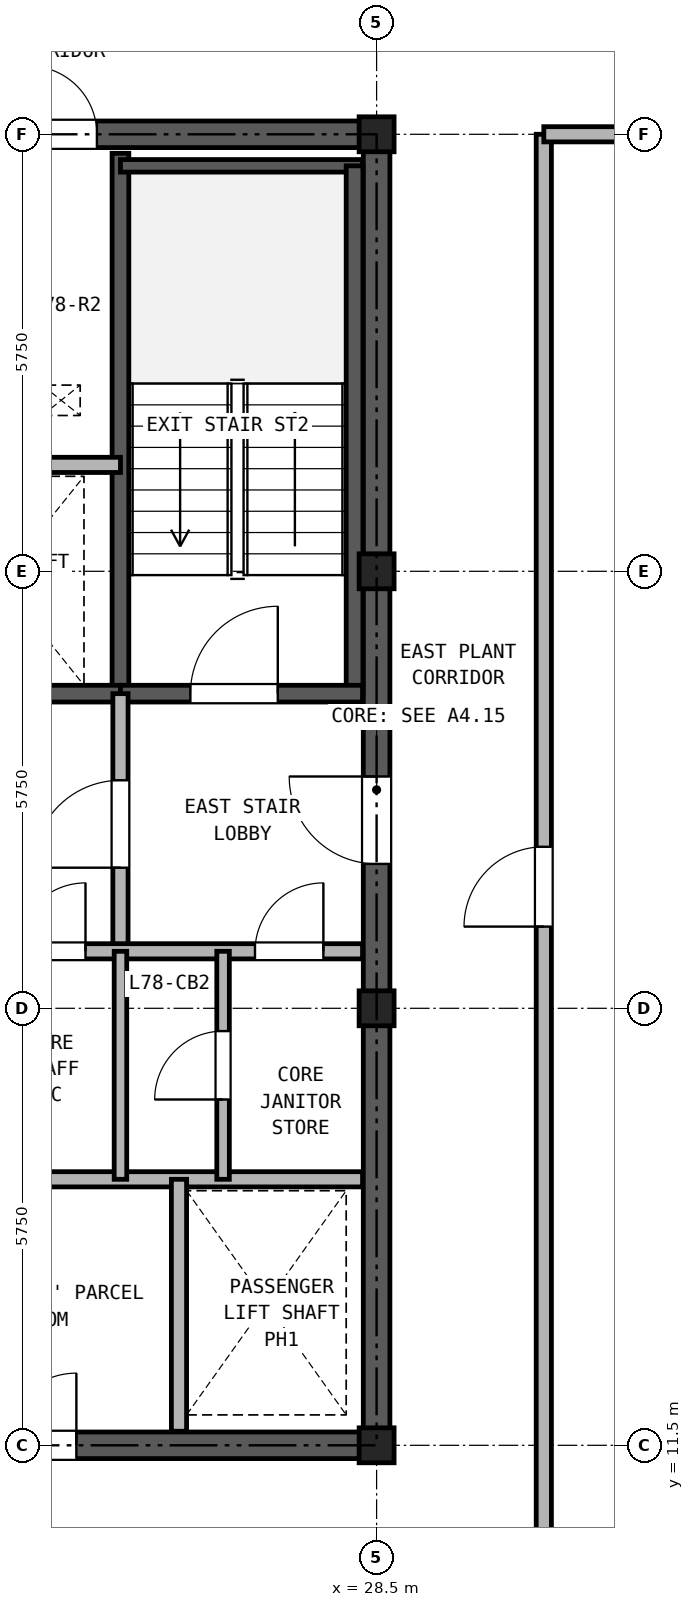
"""IFC4 building model, lengths in metres.
Left out: names, types, materials, properties, quantities, classifications, styles, units other than length and angle.
Written with IfcOpenShell. Run it as: python <this file> out.ifc"""

import sys

from ifc_helpers import new_model, si_unit, direction, frame, frame_2d, origin, origin_2d, place, context, subcontext, project, spatial, rectangle, hollow_rectangle, extrude, source, transform, mapped, element, fill, save


model = new_model("IFC4")
c1 = context("Model", 3, precision=1e-05, world=origin(), true_north=direction((0.0, 1.0)))
c2 = subcontext(c1, "Body", "Model", "MODEL_VIEW")
j1 = project(units=[si_unit("LENGTHUNIT", "METRE"), si_unit("PLANEANGLEUNIT", "RADIAN")], contexts=[c1])
p1 = place(None, origin())
s1 = spatial("IfcSite", under=j1, at=p1, CompositionType="ELEMENT")
p2 = place(p1, origin())
s2 = spatial("IfcBuilding", under=s1, at=p2, CompositionType="ELEMENT")
p3 = place(p2, frame((0.0, 0.0, 271.3)))
s3 = spatial("IfcBuildingStorey", under=s2, at=p3, CompositionType="ELEMENT", Elevation=271.3)
m1 = source(origin(), c2, "Body", "SweptSolid", [
    extrude(hollow_rectangle(XDim=0.46, YDim=0.46, WallThickness=0.025, at=origin_2d()), origin(), (0.0, 0.0, 1.0), 3.38),
])
for number, where, z_axis, x_axis in (
    (1, (28.5, 11.5, 0.0), (0.0, 0.0, 1.0), (1.0, 0.0, 0.0)),
    (2, (28.5, 17.25, 0.0), (0.0, 0.0, 1.0), (1.0, 0.0, 0.0)),
    (3, (28.5, 23.0, 0.0), (0.0, 0.0, 1.0), (1.0, 0.0, 0.0)),
    (4, (28.5, 28.75, 0.0), (0.0, 0.0, 1.0), (1.0, 0.0, 0.0)),
):
    element("IfcColumn", number, at=place(p3, frame(where, z_axis=z_axis, x_axis=x_axis)), inside=s3, PredefinedType="COLUMN", context=c2, shape_type="MappedRepresentation", body=[
        mapped(m1, transform((0.0, 0.0, 0.0), x_axis=(1.0, 0.0, 0.0), y_axis=(0.0, 1.0, 0.0), z_axis=(0.0, 0.0, 1.0), scale=1.0)),
    ])
p4 = place(p3, frame((18.325, 11.5, 0.0), z_axis=(0.0, 0.0, 1.0), x_axis=(1.0, 0.0, 0.0)))
e5 = element("IfcWall", 5, at=p4, inside=s3, PredefinedType="SHEAR", context=c2, shape_type="SweptSolid", body=[
    extrude(rectangle(XDim=10.35, YDim=0.35, at=frame_2d((5.175, 0.0))), origin(), (0.0, 0.0, 1.0), 3.38),
])
p5 = place(p4, frame((1.775, 0.0, 0.0)))
e6 = element("IfcOpeningElement", 6, at=p5, cuts=e5, PredefinedType="OPENING", context=c2, shape_type="SweptSolid", body=[
    extrude(rectangle(XDim=0.95, YDim=2.15, at=frame_2d((0.475, 1.075))), frame((0.0, 0.185, 0.0), z_axis=(0.0, -1.0, 0.0), x_axis=(1.0, 0.0, 0.0)), (0.0, 0.0, 1.0), 0.37),
])
p6 = place(p4, frame((5.275, 0.0, 0.0)))
e7 = element("IfcOpeningElement", 7, at=p6, cuts=e5, PredefinedType="OPENING", context=c2, shape_type="SweptSolid", body=[
    extrude(rectangle(XDim=0.95, YDim=2.15, at=frame_2d((0.475, 1.075))), frame((0.0, 0.185, 0.0), z_axis=(0.0, -1.0, 0.0), x_axis=(1.0, 0.0, 0.0)), (0.0, 0.0, 1.0), 0.37),
])
p7 = place(p3, frame((18.325, 28.75, 0.0), z_axis=(0.0, 0.0, 1.0), x_axis=(1.0, 0.0, 0.0)))
e8 = element("IfcWall", 8, at=p7, inside=s3, PredefinedType="SHEAR", context=c2, shape_type="SweptSolid", body=[
    extrude(rectangle(XDim=10.35, YDim=0.35, at=frame_2d((5.175, 0.0))), origin(), (0.0, 0.0, 1.0), 3.38),
])
p8 = place(p7, frame((4.055, 0.0, 0.0)))
e9 = element("IfcOpeningElement", 9, at=p8, cuts=e8, PredefinedType="OPENING", context=c2, shape_type="SweptSolid", body=[
    extrude(rectangle(XDim=0.9, YDim=2.05, at=frame_2d((0.45, 1.025))), frame((0.0, 0.185, 0.0), z_axis=(0.0, -1.0, 0.0), x_axis=(1.0, 0.0, 0.0)), (0.0, 0.0, 1.0), 0.37),
])
p9 = place(p7, frame((5.595, 0.0, 0.0)))
e10 = element("IfcOpeningElement", 10, at=p9, cuts=e8, PredefinedType="OPENING", context=c2, shape_type="SweptSolid", body=[
    extrude(rectangle(XDim=0.9, YDim=2.05, at=frame_2d((0.45, 1.025))), frame((0.0, 0.185, 0.0), z_axis=(0.0, -1.0, 0.0), x_axis=(1.0, 0.0, 0.0)), (0.0, 0.0, 1.0), 0.37),
])
p10 = place(p3, frame((28.5, 11.675, 0.0), z_axis=(0.0, 0.0, 1.0), x_axis=(0.0, 1.0, 0.0)))
e11 = element("IfcWall", 11, at=p10, inside=s3, PredefinedType="SHEAR", context=c2, shape_type="SweptSolid", body=[
    extrude(rectangle(XDim=16.9, YDim=0.35, at=frame_2d((8.45, 0.0))), origin(), (0.0, 0.0, 1.0), 3.38),
])
p11 = place(p10, frame((7.475, 0.0, 0.0)))
e12 = element("IfcOpeningElement", 12, at=p11, cuts=e11, PredefinedType="OPENING", context=c2, shape_type="SweptSolid", body=[
    extrude(rectangle(XDim=1.15, YDim=2.2, at=frame_2d((0.575, 1.1))), frame((0.0, 0.185, 0.0), z_axis=(0.0, -1.0, 0.0), x_axis=(1.0, 0.0, 0.0)), (0.0, 0.0, 1.0), 0.37),
])
p12 = place(p3, frame((25.13, 21.39, 0.0), z_axis=(0.0, 0.0, 1.0), x_axis=(0.0, 1.0, 0.0)))
e13 = element("IfcWall", 13, at=p12, inside=s3, PredefinedType="SOLIDWALL", context=c2, shape_type="SweptSolid", body=[
    extrude(rectangle(XDim=7.11, YDim=0.22, at=frame_2d((3.555, 0.0))), origin(), (0.0, 0.0, 1.0), 3.38),
])
p13 = place(p3, frame((25.13, 28.335, 0.0), z_axis=(0.0, 0.0, 1.0), x_axis=(1.0, 0.0, 0.0)))
e14 = element("IfcWall", 14, at=p13, inside=s3, PredefinedType="PARTITIONING", context=c2, shape_type="SweptSolid", body=[
    extrude(rectangle(XDim=3.185, YDim=0.165, at=frame_2d((1.593, 0.0))), origin(), (0.0, 0.0, 1.0), 3.38),
])
p14 = place(p3, frame((28.21, 21.39, 0.0), z_axis=(0.0, 0.0, 1.0), x_axis=(0.0, 1.0, 0.0)))
e15 = element("IfcWall", 15, at=p14, inside=s3, PredefinedType="SOLIDWALL", context=c2, shape_type="SweptSolid", body=[
    extrude(rectangle(XDim=6.945, YDim=0.22, at=frame_2d((3.473, 0.0))), origin(), (0.0, 0.0, 1.0), 3.38),
])
p15 = place(p3, frame((18.685, 21.39, 0.0), z_axis=(0.0, 0.0, 1.0), x_axis=(1.0, 0.0, 0.0)))
e16 = element("IfcWall", 16, at=p15, inside=s3, PredefinedType="SOLIDWALL", context=c2, shape_type="SweptSolid", body=[
    extrude(rectangle(XDim=6.445, YDim=0.22, at=frame_2d((3.222, 0.0))), origin(), (0.0, 0.0, 1.0), 3.38),
])
p16 = place(p15, frame((1.165, 0.0, 0.0)))
e17 = element("IfcOpeningElement", 17, at=p16, cuts=e16, PredefinedType="OPENING", context=c2, shape_type="SweptSolid", body=[
    extrude(rectangle(XDim=1.15, YDim=2.2, at=frame_2d((0.575, 1.1))), frame((0.0, 0.12, 0.0), z_axis=(0.0, -1.0, 0.0), x_axis=(1.0, 0.0, 0.0)), (0.0, 0.0, 1.0), 0.24),
])
p17 = place(p3, frame((25.13, 21.39, 0.0), z_axis=(0.0, 0.0, 1.0), x_axis=(1.0, 0.0, 0.0)))
e18 = element("IfcWall", 18, at=p17, inside=s3, PredefinedType="SOLIDWALL", context=c2, shape_type="SweptSolid", body=[
    extrude(rectangle(XDim=3.185, YDim=0.22, at=frame_2d((1.593, 0.0))), origin(), (0.0, 0.0, 1.0), 3.38),
])
p18 = place(p17, frame((0.92, 0.0, 0.0)))
e19 = element("IfcOpeningElement", 19, at=p18, cuts=e18, PredefinedType="OPENING", context=c2, shape_type="SweptSolid", body=[
    extrude(rectangle(XDim=1.15, YDim=2.2, at=frame_2d((0.575, 1.1))), frame((0.0, 0.12, 0.0), z_axis=(0.0, -1.0, 0.0), x_axis=(1.0, 0.0, 0.0)), (0.0, 0.0, 1.0), 0.24),
])
p19 = place(p3, frame((22.11, 24.4, 0.0), z_axis=(0.0, 0.0, 1.0), x_axis=(1.0, 0.0, 0.0)))
e20 = element("IfcWall", 20, at=p19, inside=s3, PredefinedType="PARTITIONING", context=c2, shape_type="SweptSolid", body=[
    extrude(rectangle(XDim=3.02, YDim=0.2, at=frame_2d((1.51, 0.0))), origin(), (0.0, 0.0, 1.0), 3.38),
])
p20 = place(p3, frame((25.13, 18.0, 0.0), z_axis=(0.0, 0.0, 1.0), x_axis=(0.0, 1.0, 0.0)))
e21 = element("IfcWall", 21, at=p20, inside=s3, PredefinedType="PARTITIONING", context=c2, shape_type="SweptSolid", body=[
    extrude(rectangle(XDim=3.39, YDim=0.2, at=frame_2d((1.695, 0.0))), origin(), (0.0, 0.0, 1.0), 3.38),
])
p21 = place(p20, frame((1.1, 0.0, 0.0)))
e22 = element("IfcOpeningElement", 22, at=p21, cuts=e21, PredefinedType="OPENING", context=c2, shape_type="SweptSolid", body=[
    extrude(rectangle(XDim=1.15, YDim=2.2, at=frame_2d((0.575, 1.1))), frame((0.0, 0.11, 0.0), z_axis=(0.0, -1.0, 0.0), x_axis=(1.0, 0.0, 0.0)), (0.0, 0.0, 1.0), 0.22),
])
p22 = place(p3, frame((18.685, 18.0, 0.0), z_axis=(0.0, 0.0, 1.0), x_axis=(1.0, 0.0, 0.0)))
e23 = element("IfcWall", 23, at=p22, inside=s3, PredefinedType="PARTITIONING", context=c2, shape_type="SweptSolid", body=[
    extrude(rectangle(XDim=9.63, YDim=0.2, at=frame_2d((4.815, 0.0))), origin(), (0.0, 0.0, 1.0), 3.38),
])
p23 = place(p22, frame((0.565, 0.0, 0.0)))
e24 = element("IfcOpeningElement", 24, at=p23, cuts=e23, PredefinedType="OPENING", context=c2, shape_type="SweptSolid", body=[
    extrude(rectangle(XDim=1.3, YDim=2.3, at=frame_2d((0.65, 1.15))), frame((0.0, 0.11, 0.0), z_axis=(0.0, -1.0, 0.0), x_axis=(1.0, 0.0, 0.0)), (0.0, 0.0, 1.0), 0.22),
])
p24 = place(p22, frame((2.665, 0.0, 0.0)))
e25 = element("IfcOpeningElement", 25, at=p24, cuts=e23, PredefinedType="OPENING", context=c2, shape_type="SweptSolid", body=[
    extrude(rectangle(XDim=1.3, YDim=2.3, at=frame_2d((0.65, 1.15))), frame((0.0, 0.11, 0.0), z_axis=(0.0, -1.0, 0.0), x_axis=(1.0, 0.0, 0.0)), (0.0, 0.0, 1.0), 0.22),
])
p25 = place(p22, frame((5.085, 0.0, 0.0)))
e26 = element("IfcOpeningElement", 26, at=p25, cuts=e23, PredefinedType="OPENING", context=c2, shape_type="SweptSolid", body=[
    extrude(rectangle(XDim=0.9, YDim=2.05, at=frame_2d((0.45, 1.025))), frame((0.0, 0.11, 0.0), z_axis=(0.0, -1.0, 0.0), x_axis=(1.0, 0.0, 0.0)), (0.0, 0.0, 1.0), 0.22),
])
p26 = place(p22, frame((8.215, 0.0, 0.0)))
e27 = element("IfcOpeningElement", 27, at=p26, cuts=e23, PredefinedType="OPENING", context=c2, shape_type="SweptSolid", body=[
    extrude(rectangle(XDim=0.9, YDim=2.05, at=frame_2d((0.45, 1.025))), frame((0.0, 0.11, 0.0), z_axis=(0.0, -1.0, 0.0), x_axis=(1.0, 0.0, 0.0)), (0.0, 0.0, 1.0), 0.22),
])
p27 = place(p3, frame((18.685, 15.0, 0.0), z_axis=(0.0, 0.0, 1.0), x_axis=(1.0, 0.0, 0.0)))
e28 = element("IfcWall", 28, at=p27, inside=s3, PredefinedType="PARTITIONING", context=c2, shape_type="SweptSolid", body=[
    extrude(rectangle(XDim=9.63, YDim=0.2, at=frame_2d((4.815, 0.0))), origin(), (0.0, 0.0, 1.0), 3.38),
])
p28 = place(p3, frame((25.13, 15.0, 0.0), z_axis=(0.0, 0.0, 1.0), x_axis=(0.0, 1.0, 0.0)))
e29 = element("IfcWall", 29, at=p28, inside=s3, PredefinedType="PARTITIONING", context=c2, shape_type="SweptSolid", body=[
    extrude(rectangle(XDim=3.0, YDim=0.165, at=frame_2d((1.5, 0.0))), origin(), (0.0, 0.0, 1.0), 3.38),
])
p29 = place(p3, frame((26.48, 15.0, 0.0), z_axis=(0.0, 0.0, 1.0), x_axis=(0.0, 1.0, 0.0)))
e30 = element("IfcWall", 30, at=p29, inside=s3, PredefinedType="PARTITIONING", context=c2, shape_type="SweptSolid", body=[
    extrude(rectangle(XDim=3.0, YDim=0.165, at=frame_2d((1.5, 0.0))), origin(), (0.0, 0.0, 1.0), 3.38),
])
p30 = place(p29, frame((1.05, 0.0, 0.0)))
e31 = element("IfcOpeningElement", 31, at=p30, cuts=e30, PredefinedType="OPENING", context=c2, shape_type="SweptSolid", body=[
    extrude(rectangle(XDim=0.9, YDim=2.05, at=frame_2d((0.45, 1.025))), frame((0.0, 0.093, 0.0), z_axis=(0.0, -1.0, 0.0), x_axis=(1.0, 0.0, 0.0)), (0.0, 0.0, 1.0), 0.185),
])
p31 = place(p3, frame((25.9, 11.685, 0.0), z_axis=(0.0, 0.0, 1.0), x_axis=(0.0, 1.0, 0.0)))
e32 = element("IfcWall", 32, at=p31, inside=s3, PredefinedType="PARTITIONING", context=c2, shape_type="SweptSolid", body=[
    extrude(rectangle(XDim=3.315, YDim=0.2, at=frame_2d((1.657, 0.0))), origin(), (0.0, 0.0, 1.0), 3.38),
])
p32 = place(p3, frame((30.7, 8.9, 0.0), z_axis=(0.0, 0.0, 1.0), x_axis=(0.0, 1.0, 0.0)))
e33 = element("IfcWall", 33, at=p32, inside=s3, PredefinedType="PARTITIONING", context=c2, shape_type="SweptSolid", body=[
    extrude(rectangle(XDim=19.85, YDim=0.2, at=frame_2d((9.925, 0.0))), origin(), (0.0, 0.0, 1.0), 3.38),
])
p33 = place(p32, frame((9.425, 0.0, 0.0)))
e34 = element("IfcOpeningElement", 34, at=p33, cuts=e33, PredefinedType="OPENING", context=c2, shape_type="SweptSolid", body=[
    extrude(rectangle(XDim=1.05, YDim=2.15, at=frame_2d((0.525, 1.075))), frame((0.0, 0.11, 0.0), z_axis=(0.0, -1.0, 0.0), x_axis=(1.0, 0.0, 0.0)), (0.0, 0.0, 1.0), 0.22),
])
p34 = place(p3, frame((30.7, 28.75, 0.0), z_axis=(0.0, 0.0, 1.0), x_axis=(1.0, 0.0, 0.0)))
e35 = element("IfcWall", 35, at=p34, inside=s3, PredefinedType="PARTITIONING", context=c2, shape_type="SweptSolid", body=[
    extrude(rectangle(XDim=10.85, YDim=0.2, at=frame_2d((5.425, 0.0))), origin(), (0.0, 0.0, 1.0), 2.905),
])
p35 = place(p18, frame((1.15, 0.0, 0.0), z_axis=(0.0, 0.0, 1.0), x_axis=(-1.0, 0.0, 0.0)))
e36 = element("IfcDoor", 36, at=p35, inside=s3, OperationType="SINGLE_SWING_RIGHT", PredefinedType="DOOR", context=c2, shape_type="SweptSolid", body=[
    extrude(rectangle(XDim=1.15, YDim=2.2, at=frame_2d((0.575, 1.1))), frame((0.0, 0.025, 0.0), z_axis=(0.0, -1.0, 0.0), x_axis=(1.0, 0.0, 0.0)), (0.0, 0.0, 1.0), 0.05),
])
fill(e19, e36)
p36 = place(p21, origin())
e37 = element("IfcDoor", 37, at=p36, inside=s3, OperationType="SINGLE_SWING_LEFT", PredefinedType="DOOR", context=c2, shape_type="SweptSolid", body=[
    extrude(rectangle(XDim=1.15, YDim=2.2, at=frame_2d((0.575, 1.1))), frame((0.0, 0.025, 0.0), z_axis=(0.0, -1.0, 0.0), x_axis=(1.0, 0.0, 0.0)), (0.0, 0.0, 1.0), 0.05),
])
fill(e22, e37)
p37 = place(p25, frame((0.9, 0.0, 0.0), z_axis=(0.0, 0.0, 1.0), x_axis=(-1.0, 0.0, 0.0)))
e38 = element("IfcDoor", 38, at=p37, inside=s3, OperationType="SINGLE_SWING_RIGHT", PredefinedType="DOOR", context=c2, shape_type="SweptSolid", body=[
    extrude(rectangle(XDim=0.9, YDim=2.05, at=frame_2d((0.45, 1.025))), frame((0.0, 0.025, 0.0), z_axis=(0.0, -1.0, 0.0), x_axis=(1.0, 0.0, 0.0)), (0.0, 0.0, 1.0), 0.05),
])
fill(e26, e38)
p38 = place(p30, origin())
e39 = element("IfcDoor", 39, at=p38, inside=s3, OperationType="SINGLE_SWING_LEFT", PredefinedType="DOOR", context=c2, shape_type="SweptSolid", body=[
    extrude(rectangle(XDim=0.9, YDim=2.05, at=frame_2d((0.45, 1.025))), frame((0.0, 0.025, 0.0), z_axis=(0.0, -1.0, 0.0), x_axis=(1.0, 0.0, 0.0)), (0.0, 0.0, 1.0), 0.05),
])
fill(e31, e39)
p39 = place(p26, frame((0.9, 0.0, 0.0), z_axis=(0.0, 0.0, 1.0), x_axis=(-1.0, 0.0, 0.0)))
e40 = element("IfcDoor", 40, at=p39, inside=s3, OperationType="SINGLE_SWING_RIGHT", PredefinedType="DOOR", context=c2, shape_type="SweptSolid", body=[
    extrude(rectangle(XDim=0.9, YDim=2.05, at=frame_2d((0.45, 1.025))), frame((0.0, 0.025, 0.0), z_axis=(0.0, -1.0, 0.0), x_axis=(1.0, 0.0, 0.0)), (0.0, 0.0, 1.0), 0.05),
])
fill(e27, e40)
p40 = place(p11, origin())
e41 = element("IfcDoor", 41, at=p40, inside=s3, OperationType="SINGLE_SWING_RIGHT", PredefinedType="DOOR", context=c2, shape_type="SweptSolid", body=[
    extrude(rectangle(XDim=1.15, YDim=2.2, at=frame_2d((0.575, 1.1))), frame((0.0, 0.025, 0.0), z_axis=(0.0, -1.0, 0.0), x_axis=(1.0, 0.0, 0.0)), (0.0, 0.0, 1.0), 0.05),
])
fill(e12, e41)
p41 = place(p9, origin())
e42 = element("IfcDoor", 42, at=p41, inside=s3, OperationType="SINGLE_SWING_LEFT", PredefinedType="DOOR", context=c2, shape_type="SweptSolid", body=[
    extrude(rectangle(XDim=0.9, YDim=2.05, at=frame_2d((0.45, 1.025))), frame((0.0, 0.025, 0.0), z_axis=(0.0, -1.0, 0.0), x_axis=(1.0, 0.0, 0.0)), (0.0, 0.0, 1.0), 0.05),
])
fill(e10, e42)
p42 = place(p6, frame((0.95, 0.0, 0.0), z_axis=(0.0, 0.0, 1.0), x_axis=(-1.0, 0.0, 0.0)))
e43 = element("IfcDoor", 43, at=p42, inside=s3, OperationType="SINGLE_SWING_RIGHT", PredefinedType="DOOR", context=c2, shape_type="SweptSolid", body=[
    extrude(rectangle(XDim=0.95, YDim=2.15, at=frame_2d((0.475, 1.075))), frame((0.0, 0.025, 0.0), z_axis=(0.0, -1.0, 0.0), x_axis=(1.0, 0.0, 0.0)), (0.0, 0.0, 1.0), 0.05),
])
fill(e7, e43)
p43 = place(p33, origin())
e44 = element("IfcDoor", 44, at=p43, inside=s3, OperationType="SINGLE_SWING_LEFT", PredefinedType="DOOR", context=c2, shape_type="SweptSolid", body=[
    extrude(rectangle(XDim=1.05, YDim=2.15, at=frame_2d((0.525, 1.075))), frame((0.0, 0.025, 0.0), z_axis=(0.0, -1.0, 0.0), x_axis=(1.0, 0.0, 0.0)), (0.0, 0.0, 1.0), 0.05),
])
fill(e34, e44)
save(model, sys.argv[1])
